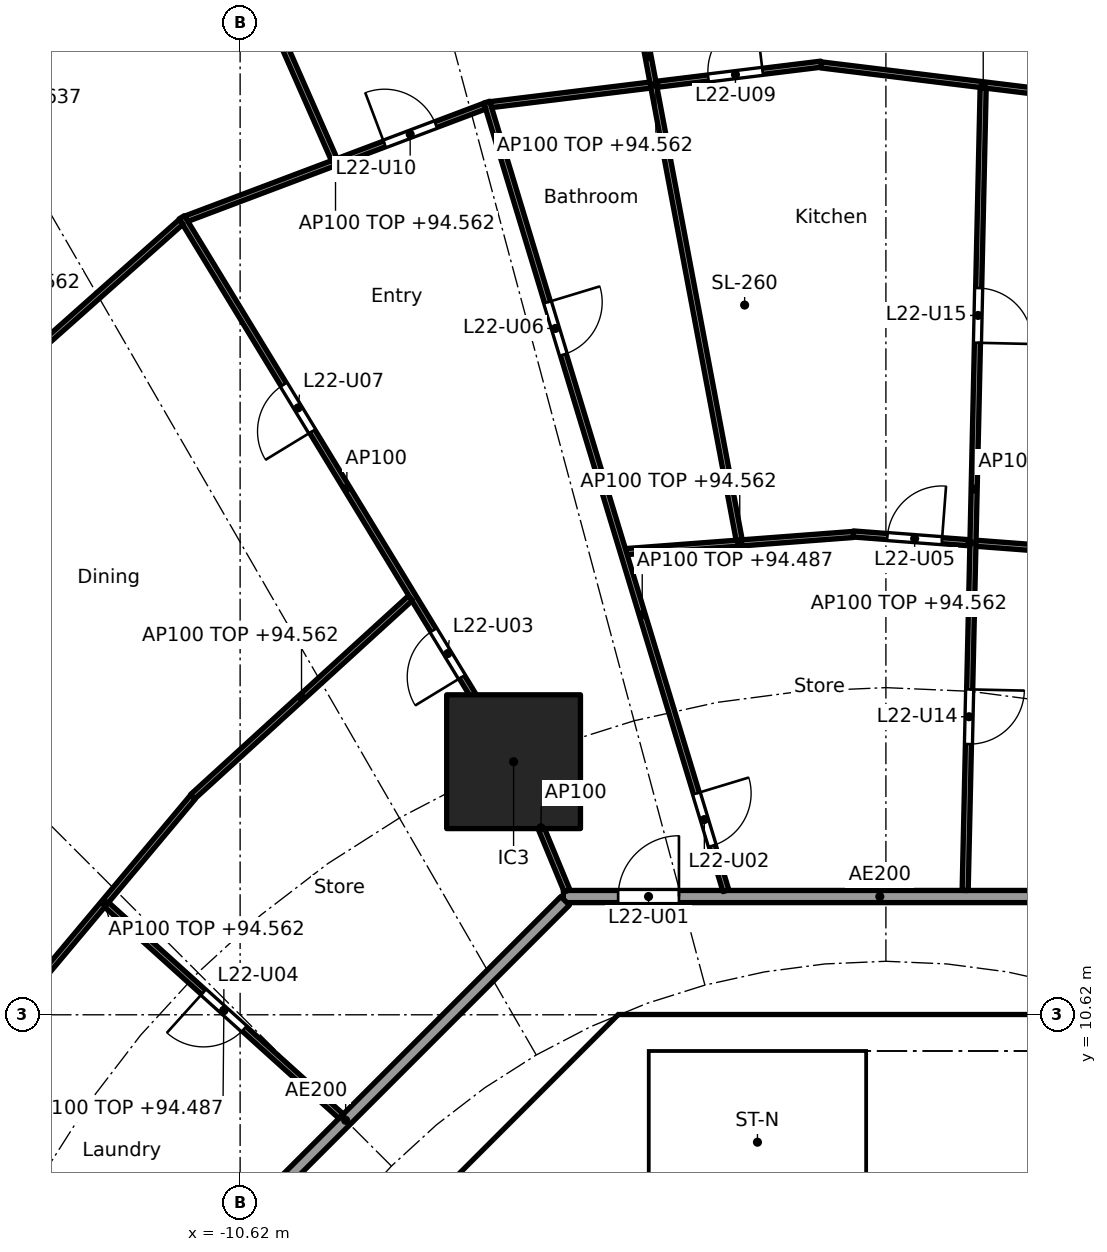
"""IFC4 building model, lengths in metres.
Left out: names, types, materials, properties, quantities, classifications, styles, units other than length and angle.
Written with IfcOpenShell. Run it as: python <this file> out.ifc"""

import sys

from ifc_helpers import new_model, si_unit, direction, frame, frame_2d, origin, origin_2d, place, context, subcontext, project, spatial, polyline, rectangle, outline, extrude, element, fill, save


model = new_model("IFC4")
c1 = context("Model", 3, precision=1e-05, world=origin(), true_north=direction((0.0, 1.0)))
c2 = subcontext(c1, "Body", "Model", "MODEL_VIEW")
j1 = project(units=[si_unit("LENGTHUNIT", "METRE"), si_unit("PLANEANGLEUNIT", "RADIAN")], contexts=[c1])
p1 = place(None, origin())
s1 = spatial("IfcSite", under=j1, at=p1, CompositionType="ELEMENT")
p2 = place(p1, origin())
s2 = spatial("IfcBuilding", under=s1, at=p2, CompositionType="ELEMENT")
p3 = place(p2, frame((0.0, 0.0, 91.8)))
s3 = spatial("IfcBuildingStorey", under=s2, at=p3, CompositionType="ELEMENT", Elevation=91.8)
p4 = place(p3, frame((-6.123, 14.782, 0.0), z_axis=(0.0, 0.0, 1.0), x_axis=(1.0, 0.0, 0.0)))
e1 = element("IfcColumn", 1, at=p4, inside=s3, PredefinedType="COLUMN", context=c2, shape_type="SweptSolid", body=[
    extrude(rectangle(XDim=2.2, YDim=2.2, at=origin_2d()), origin(), (0.0, 0.0, 1.0), 3.7),
])
p5 = place(p3, frame((-4.613, 9.988, 0.0), z_axis=(0.0, 0.0, 1.0), x_axis=(-0.707106781187, -0.707106781187, 0.0)))
e2 = element("IfcWall", 2, at=p5, inside=s3, PredefinedType="SHEAR", context=c2, shape_type="SweptSolid", body=[
    extrude(rectangle(XDim=7.602, YDim=0.6, at=frame_2d((3.801, 0.0))), origin(), (0.0, 0.0, 1.0), 3.44),
])
p6 = place(p5, frame((0.351, 0.0, 0.0)))
e3 = element("IfcOpeningElement", 3, at=p6, cuts=e2, PredefinedType="OPENING", context=c2, shape_type="SweptSolid", body=[
    extrude(rectangle(XDim=1.1, YDim=2.1, at=frame_2d((0.55, 1.05))), frame((0.0, 0.31, 0.0), z_axis=(0.0, -1.0, 0.0), x_axis=(1.0, 0.0, 0.0)), (0.0, 0.0, 1.0), 0.62),
])
p7 = place(p3, origin())
e4 = element("IfcWall", 4, at=p7, inside=s3, PredefinedType="SHEAR", context=c2, shape_type="SweptSolid", body=[
    extrude(outline(polyline([(-4.152, 10.025), (-4.401, 9.776), (-4.825, 10.2), (-4.401, 10.625), (4.401, 10.625), (4.825, 10.2), (4.401, 9.776), (4.152, 10.025), (-4.152, 10.025)])), origin(), (0.0, 0.0, 1.0), 3.44),
])
p8 = place(p3, origin())
e5 = element("IfcWall", 5, at=p8, inside=s3, PredefinedType="SOLIDWALL", context=c2, shape_type="SweptSolid", body=[
    extrude(outline(polyline([(-3.9, 7.025), (-4.1, 7.025), (-4.1, 10.025), (-3.9, 10.025), (-3.9, 7.025)])), origin(), (0.0, 0.0, 1.0), 3.44),
])
p9 = place(p3, frame((5.104, 12.565, 0.0), z_axis=(0.0, 0.0, 1.0), x_axis=(-1.0, 0.0, 0.0)))
e6 = element("IfcWall", 6, at=p9, inside=s3, PredefinedType="PARTITIONING", context=c2, shape_type="SweptSolid", body=[
    extrude(rectangle(XDim=10.409, YDim=0.2, at=frame_2d((5.205, 0.0))), origin(), (0.0, 0.0, 1.0), 3.44),
])
p10 = place(p9, frame((8.508, 0.0, 0.0)))
e7 = element("IfcOpeningElement", 7, at=p10, cuts=e6, PredefinedType="OPENING", context=c2, shape_type="SweptSolid", body=[
    extrude(rectangle(XDim=1.0, YDim=2.1, at=frame_2d((0.5, 1.05))), frame((0.0, 0.11, 0.0), z_axis=(0.0, -1.0, 0.0), x_axis=(1.0, 0.0, 0.0)), (0.0, 0.0, 1.0), 0.22),
])
p11 = place(p3, frame((-5.275, 12.494, 0.0), z_axis=(0.0, 0.0, 1.0), x_axis=(-0.707106781187, -0.707106781187, 0.0)))
e8 = element("IfcWall", 8, at=p11, inside=s3, PredefinedType="PARTITIONING", context=c2, shape_type="SweptSolid", body=[
    extrude(rectangle(XDim=10.209, YDim=0.2, at=frame_2d((5.104, 0.0))), origin(), (0.0, 0.0, 1.0), 3.44),
])
p12 = place(p3, frame((3.299, 18.237, 0.0), z_axis=(0.0, 0.0, 1.0), x_axis=(-0.997152243414, 0.075414875552, 0.0)))
e9 = element("IfcWall", 9, at=p12, inside=s3, PredefinedType="PARTITIONING", context=c2, shape_type="SweptSolid", body=[
    extrude(rectangle(XDim=3.846, YDim=0.1, at=frame_2d((1.923, 0.0))), origin(), (0.0, 0.0, 1.0), 2.762),
])
p13 = place(p12, frame((2.385, 0.0, 0.0)))
e10 = element("IfcOpeningElement", 10, at=p13, cuts=e9, PredefinedType="OPENING", context=c2, shape_type="SweptSolid", body=[
    extrude(rectangle(XDim=0.9, YDim=2.1, at=frame_2d((0.45, 1.05))), frame((0.0, 0.06, 0.0), z_axis=(0.0, -1.0, 0.0), x_axis=(1.0, 0.0, 0.0)), (0.0, 0.0, 1.0), 0.12),
])
p14 = place(p3, frame((4.267, 25.587, 0.0), z_axis=(0.0, 0.0, 1.0), x_axis=(-0.992576206119, 0.121624319302, 0.0)))
e11 = element("IfcWall", 11, at=p14, inside=s3, PredefinedType="PARTITIONING", context=c2, shape_type="SweptSolid", body=[
    extrude(rectangle(XDim=5.374, YDim=0.1, at=frame_2d((2.687, 0.0))), origin(), (0.0, 0.0, 1.0), 2.762),
])
p15 = place(p3, frame((1.303, 12.665, 0.0), z_axis=(0.0, 0.0, 1.0), x_axis=(0.022412244057, 0.999748814111, 0.0)))
e12 = element("IfcWall", 12, at=p15, inside=s3, PredefinedType="PARTITIONING", context=c2, shape_type="SweptSolid", body=[
    extrude(rectangle(XDim=13.203, YDim=0.1, at=frame_2d((6.601, 0.0))), origin(), (0.0, 0.0, 1.0), 2.687),
])
p16 = place(p15, frame((2.407, 0.0, 0.0)))
e13 = element("IfcOpeningElement", 13, at=p16, cuts=e12, PredefinedType="OPENING", context=c2, shape_type="SweptSolid", body=[
    extrude(rectangle(XDim=0.9, YDim=2.1, at=frame_2d((0.45, 1.05))), frame((0.0, 0.06, 0.0), z_axis=(0.0, -1.0, 0.0), x_axis=(1.0, 0.0, 0.0)), (0.0, 0.0, 1.0), 0.12),
])
p17 = place(p15, frame((9.009, 0.0, 0.0)))
e14 = element("IfcOpeningElement", 14, at=p17, cuts=e12, PredefinedType="OPENING", context=c2, shape_type="SweptSolid", body=[
    extrude(rectangle(XDim=0.9, YDim=2.1, at=frame_2d((0.45, 1.05))), frame((0.0, 0.06, 0.0), z_axis=(0.0, -1.0, 0.0), x_axis=(1.0, 0.0, 0.0)), (0.0, 0.0, 1.0), 0.12),
])
p18 = place(p3, frame((-0.536, 18.519, 0.0), z_axis=(0.0, 0.0, 1.0), x_axis=(-0.99715294352, -0.075405618017, 0.0)))
e15 = element("IfcWall", 15, at=p18, inside=s3, PredefinedType="PARTITIONING", context=c2, shape_type="SweptSolid", body=[
    extrude(rectangle(XDim=3.746, YDim=0.1, at=frame_2d((1.873, 0.0))), origin(), (0.0, 0.0, 1.0), 2.762),
])
p19 = place(p3, frame((-1.066, 26.253, 0.0), z_axis=(0.0, 0.0, 1.0), x_axis=(-0.992574853421, -0.121635358166, 0.0)))
e16 = element("IfcWall", 16, at=p19, inside=s3, PredefinedType="PARTITIONING", context=c2, shape_type="SweptSolid", body=[
    extrude(rectangle(XDim=5.473, YDim=0.1, at=frame_2d((2.737, 0.0))), origin(), (0.0, 0.0, 1.0), 2.762),
])
p20 = place(p19, frame((0.969, 0.0, 0.0)))
e17 = element("IfcOpeningElement", 17, at=p20, cuts=e16, PredefinedType="OPENING", context=c2, shape_type="SweptSolid", body=[
    extrude(rectangle(XDim=0.9, YDim=2.1, at=frame_2d((0.45, 1.05))), frame((0.0, 0.06, 0.0), z_axis=(0.0, -1.0, 0.0), x_axis=(1.0, 0.0, 0.0)), (0.0, 0.0, 1.0), 0.12),
])
p21 = place(p3, frame((-2.413, 18.427, 0.0), z_axis=(0.0, 0.0, 1.0), x_axis=(-0.185126823719, 0.982714637695, 0.0)))
e18 = element("IfcWall", 18, at=p21, inside=s3, PredefinedType="PARTITIONING", context=c2, shape_type="SweptSolid", body=[
    extrude(rectangle(XDim=16.176, YDim=0.1, at=frame_2d((8.088, 0.0))), origin(), (0.0, 0.0, 1.0), 2.837),
])
p22 = place(p3, frame((-2.631, 12.66, 0.0), z_axis=(0.0, 0.0, 1.0), x_axis=(-0.290161396499, 0.956977723869, 0.0)))
e19 = element("IfcWall", 19, at=p22, inside=s3, PredefinedType="PARTITIONING", context=c2, shape_type="SweptSolid", body=[
    extrude(rectangle(XDim=13.552, YDim=0.1, at=frame_2d((6.776, 0.0))), origin(), (0.0, 0.0, 1.0), 2.687),
])
p23 = place(p22, frame((0.772, 0.0, 0.0)))
e20 = element("IfcOpeningElement", 20, at=p23, cuts=e19, PredefinedType="OPENING", context=c2, shape_type="SweptSolid", body=[
    extrude(rectangle(XDim=0.9, YDim=2.1, at=frame_2d((0.45, 1.05))), frame((0.0, 0.06, 0.0), z_axis=(0.0, -1.0, 0.0), x_axis=(1.0, 0.0, 0.0)), (0.0, 0.0, 1.0), 0.12),
])
p24 = place(p22, frame((9.212, 0.0, 0.0)))
e21 = element("IfcOpeningElement", 21, at=p24, cuts=e19, PredefinedType="OPENING", context=c2, shape_type="SweptSolid", body=[
    extrude(rectangle(XDim=0.9, YDim=2.1, at=frame_2d((0.45, 1.05))), frame((0.0, 0.06, 0.0), z_axis=(0.0, -1.0, 0.0), x_axis=(1.0, 0.0, 0.0)), (0.0, 0.0, 1.0), 0.12),
])
p25 = place(p3, frame((-6.596, 25.563, 0.0), z_axis=(0.0, 0.0, 1.0), x_axis=(-0.9356162121, -0.353018843201, 0.0)))
e22 = element("IfcWall", 22, at=p25, inside=s3, PredefinedType="PARTITIONING", context=c2, shape_type="SweptSolid", body=[
    extrude(rectangle(XDim=5.249, YDim=0.1, at=frame_2d((2.625, 0.0))), origin(), (0.0, 0.0, 1.0), 2.762),
])
p26 = place(p25, frame((0.862, 0.0, 0.0)))
e23 = element("IfcOpeningElement", 23, at=p26, cuts=e22, PredefinedType="OPENING", context=c2, shape_type="SweptSolid", body=[
    extrude(rectangle(XDim=0.9, YDim=2.1, at=frame_2d((0.45, 1.05))), frame((0.0, 0.06, 0.0), z_axis=(0.0, -1.0, 0.0), x_axis=(1.0, 0.0, 0.0)), (0.0, 0.0, 1.0), 0.12),
])
p27 = place(p3, frame((-9.072, 24.683, 0.0), z_axis=(0.0, 0.0, 1.0), x_axis=(-0.403192911159, 0.915115007194, 0.0)))
e24 = element("IfcWall", 24, at=p27, inside=s3, PredefinedType="PARTITIONING", context=c2, shape_type="SweptSolid", body=[
    extrude(rectangle(XDim=8.211, YDim=0.1, at=frame_2d((4.106, 0.0))), origin(), (0.0, 0.0, 1.0), 2.837),
])
p28 = place(p27, frame((3.656, 0.0, 0.0)))
e25 = element("IfcOpeningElement", 25, at=p28, cuts=e24, PredefinedType="OPENING", context=c2, shape_type="SweptSolid", body=[
    extrude(rectangle(XDim=0.9, YDim=2.1, at=frame_2d((0.45, 1.05))), frame((0.0, 0.06, 0.0), z_axis=(0.0, -1.0, 0.0), x_axis=(1.0, 0.0, 0.0)), (0.0, 0.0, 1.0), 0.12),
])
p29 = place(p3, frame((-5.243, 12.657, 0.0), z_axis=(0.0, 0.0, 1.0), x_axis=(-0.382703272338, 0.923871314276, 0.0)))
e26 = element("IfcWall", 26, at=p29, inside=s3, PredefinedType="PARTITIONING", context=c2, shape_type="SweptSolid", body=[
    extrude(rectangle(XDim=2.249, YDim=0.1, at=frame_2d((1.125, 0.0))), origin(), (0.0, 0.0, 1.0), 3.44),
])
p30 = place(p3, frame((-6.149, 14.825, 0.0), z_axis=(0.0, 0.0, 1.0), x_axis=(-0.520411490252, 0.853915616917, 0.0)))
e27 = element("IfcWall", 27, at=p30, inside=s3, PredefinedType="PARTITIONING", context=c2, shape_type="SweptSolid", body=[
    extrude(rectangle(XDim=10.435, YDim=0.1, at=frame_2d((5.218, 0.0))), origin(), (0.0, 0.0, 1.0), 3.44),
])
p31 = place(p30, frame((1.582, 0.0, 0.0)))
e28 = element("IfcOpeningElement", 28, at=p31, cuts=e27, PredefinedType="OPENING", context=c2, shape_type="SweptSolid", body=[
    extrude(rectangle(XDim=0.9, YDim=2.1, at=frame_2d((0.45, 1.05))), frame((0.0, 0.06, 0.0), z_axis=(0.0, -1.0, 0.0), x_axis=(1.0, 0.0, 0.0)), (0.0, 0.0, 1.0), 0.12),
])
p32 = place(p30, frame((6.312, 0.0, 0.0)))
e29 = element("IfcOpeningElement", 29, at=p32, cuts=e27, PredefinedType="OPENING", context=c2, shape_type="SweptSolid", body=[
    extrude(rectangle(XDim=0.9, YDim=2.1, at=frame_2d((0.45, 1.05))), frame((0.0, 0.06, 0.0), z_axis=(0.0, -1.0, 0.0), x_axis=(1.0, 0.0, 0.0)), (0.0, 0.0, 1.0), 0.12),
])
p33 = place(p3, frame((-7.82, 17.472, 0.0), z_axis=(0.0, 0.0, 1.0), x_axis=(-0.73885182489, -0.67386792538, 0.0)))
e30 = element("IfcWall", 30, at=p33, inside=s3, PredefinedType="PARTITIONING", context=c2, shape_type="SweptSolid", body=[
    extrude(rectangle(XDim=4.846, YDim=0.1, at=frame_2d((2.423, 0.0))), origin(), (0.0, 0.0, 1.0), 2.762),
])
p34 = place(p3, frame((-11.591, 23.66, 0.0), z_axis=(0.0, 0.0, 1.0), x_axis=(-0.747429278403, -0.664341383466, 0.0)))
e31 = element("IfcWall", 31, at=p34, inside=s3, PredefinedType="PARTITIONING", context=c2, shape_type="SweptSolid", body=[
    extrude(rectangle(XDim=6.073, YDim=0.1, at=frame_2d((3.037, 0.0))), origin(), (0.0, 0.0, 1.0), 2.762),
])
p35 = place(p3, frame((-11.396, 14.202, 0.0), z_axis=(0.0, 0.0, 1.0), x_axis=(-0.642483859922, -0.766299216847, 0.0)))
e32 = element("IfcWall", 32, at=p35, inside=s3, PredefinedType="PARTITIONING", context=c2, shape_type="SweptSolid", body=[
    extrude(rectangle(XDim=4.537, YDim=0.1, at=frame_2d((2.269, 0.0))), origin(), (0.0, 0.0, 1.0), 2.762),
])
p36 = place(p3, frame((-8.959, 8.952, 0.0), z_axis=(0.0, 0.0, 1.0), x_axis=(-0.742686144764, 0.669639672045, 0.0)))
e33 = element("IfcWall", 33, at=p36, inside=s3, PredefinedType="PARTITIONING", context=c2, shape_type="SweptSolid", body=[
    extrude(rectangle(XDim=5.194, YDim=0.1, at=frame_2d((2.597, 0.0))), origin(), (0.0, 0.0, 1.0), 2.687),
])
p37 = place(p36, frame((2.147, 0.0, 0.0)))
e34 = element("IfcOpeningElement", 34, at=p37, cuts=e33, PredefinedType="OPENING", context=c2, shape_type="SweptSolid", body=[
    extrude(rectangle(XDim=0.9, YDim=2.1, at=frame_2d((0.45, 1.05))), frame((0.0, 0.06, 0.0), z_axis=(0.0, -1.0, 0.0), x_axis=(1.0, 0.0, 0.0)), (0.0, 0.0, 1.0), 0.12),
])
p38 = place(p6, origin())
e35 = element("IfcDoor", 35, at=p38, inside=s3, OperationType="SINGLE_SWING_RIGHT", PredefinedType="DOOR", context=c2, shape_type="SweptSolid", body=[
    extrude(rectangle(XDim=1.1, YDim=2.1, at=frame_2d((0.55, 1.05))), frame((0.0, 0.025, 0.0), z_axis=(0.0, -1.0, 0.0), x_axis=(1.0, 0.0, 0.0)), (0.0, 0.0, 1.0), 0.05),
])
fill(e3, e35)
p39 = place(p10, frame((1.0, 0.0, 0.0), x_axis=(-1.0, 0.0, 0.0)))
e36 = element("IfcDoor", 36, at=p39, inside=s3, OperationType="SINGLE_SWING_RIGHT", PredefinedType="DOOR", context=c2, shape_type="SweptSolid", body=[
    extrude(rectangle(XDim=1.0, YDim=2.1, at=frame_2d((0.5, 1.05))), frame((0.0, 0.025, 0.0), z_axis=(0.0, -1.0, 0.0), x_axis=(1.0, 0.0, 0.0)), (0.0, 0.0, 1.0), 0.05),
])
fill(e7, e36)
p40 = place(p23, frame((0.9, 0.0, 0.0), x_axis=(-1.0, 0.0, 0.0)))
e37 = element("IfcDoor", 37, at=p40, inside=s3, OperationType="SINGLE_SWING_LEFT", PredefinedType="DOOR", context=c2, shape_type="SweptSolid", body=[
    extrude(rectangle(XDim=0.9, YDim=2.1, at=frame_2d((0.45, 1.05))), frame((0.0, 0.025, 0.0), z_axis=(0.0, -1.0, 0.0), x_axis=(1.0, 0.0, 0.0)), (0.0, 0.0, 1.0), 0.05),
])
fill(e20, e37)
p41 = place(p31, origin())
e38 = element("IfcDoor", 38, at=p41, inside=s3, OperationType="SINGLE_SWING_LEFT", PredefinedType="DOOR", context=c2, shape_type="SweptSolid", body=[
    extrude(rectangle(XDim=0.9, YDim=2.1, at=frame_2d((0.45, 1.05))), frame((0.0, 0.025, 0.0), z_axis=(0.0, -1.0, 0.0), x_axis=(1.0, 0.0, 0.0)), (0.0, 0.0, 1.0), 0.05),
])
fill(e28, e38)
p42 = place(p37, origin())
e39 = element("IfcDoor", 39, at=p42, inside=s3, OperationType="SINGLE_SWING_RIGHT", PredefinedType="DOOR", context=c2, shape_type="SweptSolid", body=[
    extrude(rectangle(XDim=0.9, YDim=2.1, at=frame_2d((0.45, 1.05))), frame((0.0, 0.025, 0.0), z_axis=(0.0, -1.0, 0.0), x_axis=(1.0, 0.0, 0.0)), (0.0, 0.0, 1.0), 0.05),
])
fill(e34, e39)
p43 = place(p13, frame((0.9, 0.0, 0.0), x_axis=(-1.0, 0.0, 0.0)))
e40 = element("IfcDoor", 40, at=p43, inside=s3, OperationType="SINGLE_SWING_RIGHT", PredefinedType="DOOR", context=c2, shape_type="SweptSolid", body=[
    extrude(rectangle(XDim=0.9, YDim=2.1, at=frame_2d((0.45, 1.05))), frame((0.0, 0.025, 0.0), z_axis=(0.0, -1.0, 0.0), x_axis=(1.0, 0.0, 0.0)), (0.0, 0.0, 1.0), 0.05),
])
fill(e10, e40)
p44 = place(p24, frame((0.9, 0.0, 0.0), x_axis=(-1.0, 0.0, 0.0)))
e41 = element("IfcDoor", 41, at=p44, inside=s3, OperationType="SINGLE_SWING_LEFT", PredefinedType="DOOR", context=c2, shape_type="SweptSolid", body=[
    extrude(rectangle(XDim=0.9, YDim=2.1, at=frame_2d((0.45, 1.05))), frame((0.0, 0.025, 0.0), z_axis=(0.0, -1.0, 0.0), x_axis=(1.0, 0.0, 0.0)), (0.0, 0.0, 1.0), 0.05),
])
fill(e21, e41)
p45 = place(p32, origin())
e42 = element("IfcDoor", 42, at=p45, inside=s3, OperationType="SINGLE_SWING_LEFT", PredefinedType="DOOR", context=c2, shape_type="SweptSolid", body=[
    extrude(rectangle(XDim=0.9, YDim=2.1, at=frame_2d((0.45, 1.05))), frame((0.0, 0.025, 0.0), z_axis=(0.0, -1.0, 0.0), x_axis=(1.0, 0.0, 0.0)), (0.0, 0.0, 1.0), 0.05),
])
fill(e29, e42)
p46 = place(p20, frame((0.9, 0.0, 0.0), x_axis=(-1.0, 0.0, 0.0)))
e43 = element("IfcDoor", 43, at=p46, inside=s3, OperationType="SINGLE_SWING_RIGHT", PredefinedType="DOOR", context=c2, shape_type="SweptSolid", body=[
    extrude(rectangle(XDim=0.9, YDim=2.1, at=frame_2d((0.45, 1.05))), frame((0.0, 0.025, 0.0), z_axis=(0.0, -1.0, 0.0), x_axis=(1.0, 0.0, 0.0)), (0.0, 0.0, 1.0), 0.05),
])
fill(e17, e43)
p47 = place(p26, frame((0.9, 0.0, 0.0), x_axis=(-1.0, 0.0, 0.0)))
e44 = element("IfcDoor", 44, at=p47, inside=s3, OperationType="SINGLE_SWING_LEFT", PredefinedType="DOOR", context=c2, shape_type="SweptSolid", body=[
    extrude(rectangle(XDim=0.9, YDim=2.1, at=frame_2d((0.45, 1.05))), frame((0.0, 0.025, 0.0), z_axis=(0.0, -1.0, 0.0), x_axis=(1.0, 0.0, 0.0)), (0.0, 0.0, 1.0), 0.05),
])
fill(e23, e44)
p48 = place(p16, frame((0.9, 0.0, 0.0), x_axis=(-1.0, 0.0, 0.0)))
e45 = element("IfcDoor", 45, at=p48, inside=s3, OperationType="SINGLE_SWING_LEFT", PredefinedType="DOOR", context=c2, shape_type="SweptSolid", body=[
    extrude(rectangle(XDim=0.9, YDim=2.1, at=frame_2d((0.45, 1.05))), frame((0.0, 0.025, 0.0), z_axis=(0.0, -1.0, 0.0), x_axis=(1.0, 0.0, 0.0)), (0.0, 0.0, 1.0), 0.05),
])
fill(e13, e45)
p49 = place(p17, frame((0.9, 0.0, 0.0), x_axis=(-1.0, 0.0, 0.0)))
e46 = element("IfcDoor", 46, at=p49, inside=s3, OperationType="SINGLE_SWING_RIGHT", PredefinedType="DOOR", context=c2, shape_type="SweptSolid", body=[
    extrude(rectangle(XDim=0.9, YDim=2.1, at=frame_2d((0.45, 1.05))), frame((0.0, 0.025, 0.0), z_axis=(0.0, -1.0, 0.0), x_axis=(1.0, 0.0, 0.0)), (0.0, 0.0, 1.0), 0.05),
])
fill(e14, e46)
save(model, sys.argv[1])
